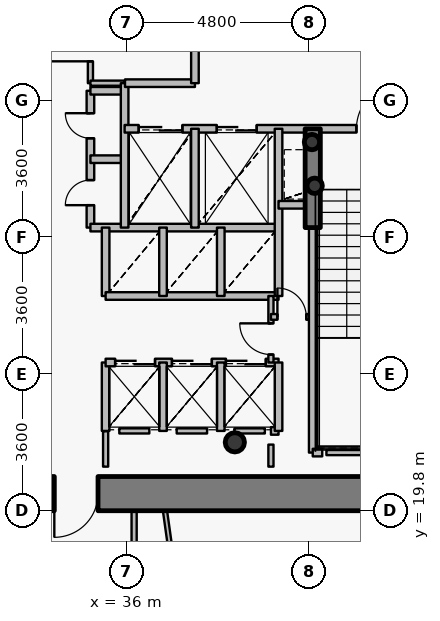
"""IFC4 building model, lengths in metres.
Left out: names, types, materials, properties, quantities, classifications, styles, units other than length and angle.
Written with IfcOpenShell. Run it as: python <this file> out.ifc"""

import sys

from ifc_helpers import new_model, si_unit, direction, frame, frame_2d, origin, origin_2d, place, context, subcontext, project, spatial, rectangle, hollow_circle, extrude, source, transform, mapped, element, fill, save


model = new_model("IFC4")
c1 = context("Model", 3, precision=1e-05, world=origin(), true_north=direction((0.0, 1.0)))
c2 = subcontext(c1, "Body", "Model", "MODEL_VIEW")
j1 = project(units=[si_unit("LENGTHUNIT", "METRE"), si_unit("PLANEANGLEUNIT", "RADIAN")], contexts=[c1])
p1 = place(None, origin())
s1 = spatial("IfcSite", under=j1, at=p1, CompositionType="ELEMENT")
p2 = place(p1, origin())
s2 = spatial("IfcBuilding", under=s1, at=p2, CompositionType="ELEMENT")
p3 = place(p2, frame((0.0, 0.0, 49.2)))
s3 = spatial("IfcBuildingStorey", under=s2, at=p3, CompositionType="ELEMENT", Elevation=49.2)
p4 = place(p3, frame((38.85, 21.6, 0.0), z_axis=(0.0, 0.0, 1.0), x_axis=(1.0, 0.0, 0.0)))
e1 = element("IfcColumn", 1, at=p4, inside=s3, PredefinedType="COLUMN", context=c2, shape_type="SweptSolid", body=[
    extrude(hollow_circle(Radius=0.254, WallThickness=0.02, at=origin_2d()), origin(), (0.0, 0.0, 1.0), 4.2),
])
for number, where, z_axis, x_axis in (
    (2, (40.95, 28.35, 0.0), (0.0, 0.0, 1.0), (1.0, 0.0, 0.0)),
    (3, (40.88, 29.5, 0.0), (0.0, 0.0, 1.0), (1.0, 0.0, 0.0)),
):
    element("IfcColumn", number, at=place(p3, frame(where, z_axis=z_axis, x_axis=x_axis)), inside=s3, PredefinedType="COLUMN", context=c2, shape_type="SweptSolid", body=[
        extrude(hollow_circle(Radius=0.203, WallThickness=0.016, at=origin_2d()), origin(), (0.0, 0.0, 1.0), 4.2),
    ])
p5 = place(p3, frame((45.25, 20.25, 0.0), z_axis=(0.0, 0.0, 1.0), x_axis=(-1.0, 0.0, 0.0)))
e4 = element("IfcWall", 4, at=p5, inside=s3, PredefinedType="SHEAR", context=c2, shape_type="SweptSolid", body=[
    extrude(rectangle(XDim=18.5, YDim=0.9, at=frame_2d((9.25, 0.0))), origin(), (0.0, 0.0, 1.0), 3.4),
])
p6 = place(p5, frame((10.0, 0.0, 0.0)))
e5 = element("IfcOpeningElement", 5, at=p6, cuts=e4, PredefinedType="OPENING", context=c2, shape_type="SweptSolid", body=[
    extrude(rectangle(XDim=1.15, YDim=2.15, at=origin_2d()), frame((0.575, 0.46, 1.075), z_axis=(0.0, -1.0, 0.0), x_axis=(1.0, 0.0, 0.0)), (0.0, 0.0, 1.0), 0.92),
])
p7 = place(p3, frame((40.9, 27.25, 0.0), z_axis=(0.0, 0.0, 1.0), x_axis=(0.0, 1.0, 0.0)))
e6 = element("IfcWall", 6, at=p7, inside=s3, PredefinedType="SHEAR", context=c2, shape_type="SweptSolid", body=[
    extrude(rectangle(XDim=2.6, YDim=0.4, at=frame_2d((1.3, 0.0))), origin(), (0.0, 0.0, 1.0), 3.55),
])
p8 = place(p3, frame((35.05, 27.25, 0.0), z_axis=(0.0, 0.0, 1.0), x_axis=(0.0, 1.0, 0.0)))
e7 = element("IfcWall", 7, at=p8, inside=s3, PredefinedType="PARTITIONING", context=c2, shape_type="SweptSolid", body=[
    extrude(rectangle(XDim=3.6, YDim=0.2, at=frame_2d((1.8, 0.0))), origin(), (0.0, 0.0, 1.0), 3.95),
])
p9 = place(p8, frame((0.59, 0.0, 0.0)))
e8 = element("IfcOpeningElement", 8, at=p9, cuts=e7, PredefinedType="OPENING", context=c2, shape_type="SweptSolid", body=[
    extrude(rectangle(XDim=0.66, YDim=2.05, at=origin_2d()), frame((0.33, 0.11, 1.025), z_axis=(0.0, -1.0, 0.0), x_axis=(1.0, 0.0, 0.0)), (0.0, 0.0, 1.0), 0.22),
])
p10 = place(p8, frame((2.35, 0.0, 0.0)))
e9 = element("IfcOpeningElement", 9, at=p10, cuts=e7, PredefinedType="OPENING", context=c2, shape_type="SweptSolid", body=[
    extrude(rectangle(XDim=0.66, YDim=2.05, at=origin_2d()), frame((0.33, 0.11, 1.025), z_axis=(0.0, -1.0, 0.0), x_axis=(1.0, 0.0, 0.0)), (0.0, 0.0, 1.0), 0.22),
])
p11 = place(p3, frame((35.05, 27.25, 0.0), z_axis=(0.0, 0.0, 1.0), x_axis=(1.0, 0.0, 0.0)))
e10 = element("IfcWall", 10, at=p11, inside=s3, PredefinedType="PARTITIONING", context=c2, shape_type="SweptSolid", body=[
    extrude(rectangle(XDim=4.95, YDim=0.2, at=frame_2d((2.475, 0.0))), origin(), (0.0, 0.0, 1.0), 3.535),
])
for number, where, z_axis, x_axis in (
    (11, (35.05, 29.05, 0.0), (0.0, 0.0, 1.0), (1.0, 0.0, 0.0)),
    (12, (35.05, 30.85, 0.0), (0.0, 0.0, 1.0), (1.0, 0.0, 0.0)),
):
    element("IfcWall", number, at=place(p3, frame(where, z_axis=z_axis, x_axis=x_axis)), inside=s3, PredefinedType="PARTITIONING", context=c2, shape_type="SweptSolid", body=[
        extrude(rectangle(XDim=0.9, YDim=0.2, at=frame_2d((0.45, 0.0))), origin(), (0.0, 0.0, 1.0), 3.95),
    ])
p12 = place(p3, frame((35.05, 31.05, 0.0), z_axis=(0.0, 0.0, 1.0), x_axis=(0.0, 1.0, 0.0)))
e13 = element("IfcWall", 13, at=p12, inside=s3, PredefinedType="PARTITIONING", context=c2, shape_type="SweptSolid", body=[
    extrude(rectangle(XDim=2.25, YDim=0.135, at=frame_2d((1.125, 0.0))), origin(), (0.0, 0.0, 1.0), 3.535),
])
p13 = place(p12, frame((0.575, 0.0, 0.0)))
e14 = element("IfcOpeningElement", 14, at=p13, cuts=e13, PredefinedType="OPENING", context=c2, shape_type="SweptSolid", body=[
    extrude(rectangle(XDim=1.1, YDim=2.15, at=origin_2d()), frame((0.55, 0.078, 1.075), z_axis=(0.0, -1.0, 0.0), x_axis=(1.0, 0.0, 0.0)), (0.0, 0.0, 1.0), 0.155),
])
p14 = place(p3, frame((35.05, 31.05, 0.0), z_axis=(0.0, 0.0, 1.0), x_axis=(1.0, 0.0, 0.0)))
e15 = element("IfcWall", 15, at=p14, inside=s3, PredefinedType="PARTITIONING", context=c2, shape_type="SweptSolid", body=[
    extrude(rectangle(XDim=0.9, YDim=0.135, at=frame_2d((0.45, 0.0))), origin(), (0.0, 0.0, 1.0), 3.95),
])
p15 = place(p3, frame((35.45, 21.9, 0.0), z_axis=(0.0, 0.0, 1.0), x_axis=(0.0, 1.0, 0.0)))
e16 = element("IfcWall", 16, at=p15, inside=s3, PredefinedType="PARTITIONING", context=c2, shape_type="SweptSolid", body=[
    extrude(rectangle(XDim=1.8, YDim=0.2, at=frame_2d((0.9, 0.0))), origin(), (0.0, 0.0, 1.0), 3.95),
])
p16 = place(p3, frame((35.45, 23.7, 0.0), z_axis=(0.0, 0.0, 1.0), x_axis=(1.0, 0.0, 0.0)))
e17 = element("IfcWall", 17, at=p16, inside=s3, PredefinedType="PARTITIONING", context=c2, shape_type="SweptSolid", body=[
    extrude(rectangle(XDim=4.55, YDim=0.2, at=frame_2d((2.275, 0.0))), origin(), (0.0, 0.0, 1.0), 3.535),
])
p17 = place(p16, frame((0.25, 0.0, 0.0)))
e18 = element("IfcOpeningElement", 18, at=p17, cuts=e17, PredefinedType="OPENING", context=c2, shape_type="SweptSolid", body=[
    extrude(rectangle(XDim=1.05, YDim=2.15, at=origin_2d()), frame((0.525, 0.11, 1.075), z_axis=(0.0, -1.0, 0.0), x_axis=(1.0, 0.0, 0.0)), (0.0, 0.0, 1.0), 0.22),
])
p18 = place(p16, frame((1.745, 0.0, 0.0)))
e19 = element("IfcOpeningElement", 19, at=p18, cuts=e17, PredefinedType="OPENING", context=c2, shape_type="SweptSolid", body=[
    extrude(rectangle(XDim=1.05, YDim=2.15, at=origin_2d()), frame((0.525, 0.11, 1.075), z_axis=(0.0, -1.0, 0.0), x_axis=(1.0, 0.0, 0.0)), (0.0, 0.0, 1.0), 0.22),
])
p19 = place(p16, frame((3.165, 0.0, 0.0)))
e20 = element("IfcOpeningElement", 20, at=p19, cuts=e17, PredefinedType="OPENING", context=c2, shape_type="SweptSolid", body=[
    extrude(rectangle(XDim=1.05, YDim=2.15, at=origin_2d()), frame((0.525, 0.11, 1.075), z_axis=(0.0, -1.0, 0.0), x_axis=(1.0, 0.0, 0.0)), (0.0, 0.0, 1.0), 0.22),
])
p20 = place(p3, frame((35.45, 25.45, 0.0), z_axis=(0.0, 0.0, 1.0), x_axis=(0.0, 1.0, 0.0)))
e21 = element("IfcWall", 21, at=p20, inside=s3, PredefinedType="PARTITIONING", context=c2, shape_type="SweptSolid", body=[
    extrude(rectangle(XDim=1.8, YDim=0.2, at=frame_2d((0.9, 0.0))), origin(), (0.0, 0.0, 1.0), 3.95),
])
p21 = place(p3, frame((35.45, 25.45, 0.0), z_axis=(0.0, 0.0, 1.0), x_axis=(1.0, 0.0, 0.0)))
e22 = element("IfcWall", 22, at=p21, inside=s3, PredefinedType="PARTITIONING", context=c2, shape_type="SweptSolid", body=[
    extrude(rectangle(XDim=4.55, YDim=0.2, at=frame_2d((2.275, 0.0))), origin(), (0.0, 0.0, 1.0), 3.535),
])
p22 = place(p3, frame((35.95, 27.25, 0.0), z_axis=(0.0, 0.0, 1.0), x_axis=(0.0, 1.0, 0.0)))
e23 = element("IfcWall", 23, at=p22, inside=s3, PredefinedType="PARTITIONING", context=c2, shape_type="SweptSolid", body=[
    extrude(rectangle(XDim=3.8, YDim=0.2, at=frame_2d((1.9, 0.0))), origin(), (0.0, 0.0, 1.0), 3.95),
])
p23 = place(p3, frame((35.95, 29.85, 0.0), z_axis=(0.0, 0.0, 1.0), x_axis=(1.0, 0.0, 0.0)))
e24 = element("IfcWall", 24, at=p23, inside=s3, PredefinedType="PARTITIONING", context=c2, shape_type="SweptSolid", body=[
    extrude(rectangle(XDim=8.49, YDim=0.2, at=frame_2d((4.245, 0.0))), origin(), (0.0, 0.0, 1.0), 3.535),
])
p24 = place(p23, frame((6.1, 0.0, 0.0)))
e25 = element("IfcOpeningElement", 25, at=p24, cuts=e24, PredefinedType="OPENING", context=c2, shape_type="SweptSolid", body=[
    extrude(rectangle(XDim=1.2, YDim=2.15, at=origin_2d()), frame((0.6, 0.11, 1.075), z_axis=(0.0, -1.0, 0.0), x_axis=(1.0, 0.0, 0.0)), (0.0, 0.0, 1.0), 0.22),
])
p25 = place(p23, frame((0.37, 0.0, 0.0)))
e26 = element("IfcOpeningElement", 26, at=p25, cuts=e24, PredefinedType="OPENING", context=c2, shape_type="SweptSolid", body=[
    extrude(rectangle(XDim=1.15, YDim=2.15, at=origin_2d()), frame((0.575, 0.11, 1.075), z_axis=(0.0, -1.0, 0.0), x_axis=(1.0, 0.0, 0.0)), (0.0, 0.0, 1.0), 0.22),
])
p26 = place(p23, frame((2.425, 0.0, 0.0)))
e27 = element("IfcOpeningElement", 27, at=p26, cuts=e24, PredefinedType="OPENING", context=c2, shape_type="SweptSolid", body=[
    extrude(rectangle(XDim=1.05, YDim=2.15, at=origin_2d()), frame((0.525, 0.11, 1.075), z_axis=(0.0, -1.0, 0.0), x_axis=(1.0, 0.0, 0.0)), (0.0, 0.0, 1.0), 0.22),
])
p27 = place(p3, frame((35.96, 31.05, 0.0), z_axis=(0.0, 0.0, 1.0), x_axis=(1.0, 0.0, 0.0)))
e28 = element("IfcWall", 28, at=p27, inside=s3, PredefinedType="PARTITIONING", context=c2, shape_type="SweptSolid", body=[
    extrude(rectangle(XDim=1.84, YDim=0.2, at=frame_2d((0.92, 0.0))), origin(), (0.0, 0.0, 1.0), 3.95),
])
p28 = place(p3, frame((36.2, 17.9, 0.0), z_axis=(0.0, 0.0, 1.0), x_axis=(0.0, 1.0, 0.0)))
e29 = element("IfcWall", 29, at=p28, inside=s3, PredefinedType="PARTITIONING", context=c2, shape_type="SweptSolid", body=[
    extrude(rectangle(XDim=1.9, YDim=0.135, at=frame_2d((0.95, 0.0))), origin(), (0.0, 0.0, 1.0), 3.285),
])
for number, where, z_axis, x_axis in (
    (30, (36.96, 21.9, 0.0), (0.0, 0.0, 1.0), (0.0, 1.0, 0.0)),
    (31, (36.96, 25.45, 0.0), (0.0, 0.0, 1.0), (0.0, 1.0, 0.0)),
):
    element("IfcWall", number, at=place(p3, frame(where, z_axis=z_axis, x_axis=x_axis)), inside=s3, PredefinedType="PARTITIONING", context=c2, shape_type="SweptSolid", body=[
        extrude(rectangle(XDim=1.8, YDim=0.2, at=frame_2d((0.9, 0.0))), origin(), (0.0, 0.0, 1.0), 3.95),
    ])
p29 = place(p3, frame((37.012, 19.8, 0.0), z_axis=(0.0, 0.0, 1.0), x_axis=(0.139168038406, -0.990268780224, 0.0)))
e32 = element("IfcWall", 32, at=p29, inside=s3, PredefinedType="MOVABLE", context=c2, shape_type="SweptSolid", body=[
    extrude(rectangle(XDim=17.067, YDim=0.11, at=frame_2d((8.534, 0.0))), origin(), (0.0, 0.0, 1.0), 3.335),
])
p30 = place(p3, frame((37.8, 27.25, 0.0), z_axis=(0.0, 0.0, 1.0), x_axis=(0.0, 1.0, 0.0)))
e33 = element("IfcWall", 33, at=p30, inside=s3, PredefinedType="PARTITIONING", context=c2, shape_type="SweptSolid", body=[
    extrude(rectangle(XDim=2.6, YDim=0.2, at=frame_2d((1.3, 0.0))), origin(), (0.0, 0.0, 1.0), 3.95),
])
p31 = place(p3, frame((37.8, 31.05, 0.0), z_axis=(0.0, 0.0, 1.0), x_axis=(0.0, 1.0, 0.0)))
e34 = element("IfcWall", 34, at=p31, inside=s3, PredefinedType="PARTITIONING", context=c2, shape_type="SweptSolid", body=[
    extrude(rectangle(XDim=2.25, YDim=0.2, at=frame_2d((1.125, 0.0))), origin(), (0.0, 0.0, 1.0), 3.535),
])
for number, where, z_axis, x_axis in (
    (35, (38.48, 21.9, 0.0), (0.0, 0.0, 1.0), (0.0, 1.0, 0.0)),
    (36, (38.48, 25.45, 0.0), (0.0, 0.0, 1.0), (0.0, 1.0, 0.0)),
):
    element("IfcWall", number, at=place(p3, frame(where, z_axis=z_axis, x_axis=x_axis)), inside=s3, PredefinedType="PARTITIONING", context=c2, shape_type="SweptSolid", body=[
        extrude(rectangle(XDim=1.8, YDim=0.2, at=frame_2d((0.9, 0.0))), origin(), (0.0, 0.0, 1.0), 3.95),
    ])
p32 = place(p3, frame((39.8, 21.9, 0.0), z_axis=(0.0, 0.0, 1.0), x_axis=(1.0, 0.0, 0.0)))
e37 = element("IfcWall", 37, at=p32, inside=s3, PredefinedType="PARTITIONING", context=c2, shape_type="SweptSolid", body=[
    extrude(rectangle(XDim=0.2, YDim=0.2, at=frame_2d((0.1, 0.0))), origin(), (0.0, 0.0, 1.0), 3.95),
])
p33 = place(p3, frame((39.8, 23.7, 0.0), z_axis=(0.0, 0.0, 1.0), x_axis=(0.0, 1.0, 0.0)))
e38 = element("IfcWall", 38, at=p33, inside=s3, PredefinedType="PARTITIONING", context=c2, shape_type="SweptSolid", body=[
    extrude(rectangle(XDim=1.75, YDim=0.135, at=frame_2d((0.875, 0.0))), origin(), (0.0, 0.0, 1.0), 3.95),
])
p34 = place(p33, frame((0.21, 0.0, 0.0)))
e39 = element("IfcOpeningElement", 39, at=p34, cuts=e38, PredefinedType="OPENING", context=c2, shape_type="SweptSolid", body=[
    extrude(rectangle(XDim=0.82, YDim=2.1, at=origin_2d()), frame((0.41, 0.078, 1.05), z_axis=(0.0, -1.0, 0.0), x_axis=(1.0, 0.0, 0.0)), (0.0, 0.0, 1.0), 0.155),
])
p35 = place(p3, frame((39.8, 24.9, 0.0), z_axis=(0.0, 0.0, 1.0), x_axis=(1.0, 0.0, 0.0)))
e40 = element("IfcWall", 40, at=p35, inside=s3, PredefinedType="PARTITIONING", context=c2, shape_type="SweptSolid", body=[
    extrude(rectangle(XDim=1.1, YDim=0.15, at=frame_2d((0.55, 0.0))), origin(), (0.0, 0.0, 1.0), 3.95),
])
p36 = place(p35, frame((0.17, 0.0, 0.0)))
e41 = element("IfcOpeningElement", 41, at=p36, cuts=e40, PredefinedType="OPENING", context=c2, shape_type="SweptSolid", body=[
    extrude(rectangle(XDim=0.76, YDim=2.1, at=origin_2d()), frame((0.38, 0.085, 1.05), z_axis=(0.0, -1.0, 0.0), x_axis=(1.0, 0.0, 0.0)), (0.0, 0.0, 1.0), 0.17),
])
p37 = place(p3, frame((40.0, 21.9, 0.0), z_axis=(0.0, 0.0, 1.0), x_axis=(0.0, 1.0, 0.0)))
e42 = element("IfcWall", 42, at=p37, inside=s3, PredefinedType="PARTITIONING", context=c2, shape_type="SweptSolid", body=[
    extrude(rectangle(XDim=1.8, YDim=0.2, at=frame_2d((0.9, 0.0))), origin(), (0.0, 0.0, 1.0), 3.95),
])
p38 = place(p3, frame((40.0, 25.45, 0.0), z_axis=(0.0, 0.0, 1.0), x_axis=(0.0, 1.0, 0.0)))
e43 = element("IfcWall", 43, at=p38, inside=s3, PredefinedType="PARTITIONING", context=c2, shape_type="SweptSolid", body=[
    extrude(rectangle(XDim=4.4, YDim=0.2, at=frame_2d((2.2, 0.0))), origin(), (0.0, 0.0, 1.0), 3.95),
])
p39 = place(p3, frame((40.0, 27.85, 0.0), z_axis=(0.0, 0.0, 1.0), x_axis=(1.0, 0.0, 0.0)))
e44 = element("IfcWall", 44, at=p39, inside=s3, PredefinedType="PARTITIONING", context=c2, shape_type="SweptSolid", body=[
    extrude(rectangle(XDim=0.9, YDim=0.2, at=frame_2d((0.45, 0.0))), origin(), (0.0, 0.0, 1.0), 3.95),
])
p40 = place(p3, frame((40.9, 21.33, 0.0), z_axis=(0.0, 0.0, 1.0), x_axis=(0.0, 1.0, 0.0)))
e45 = element("IfcWall", 45, at=p40, inside=s3, PredefinedType="PARTITIONING", context=c2, shape_type="SweptSolid", body=[
    extrude(rectangle(XDim=5.91, YDim=0.2, at=frame_2d((2.955, 0.0))), origin(), (0.0, 0.0, 1.0), 3.485),
])
p41 = place(p3, frame((40.9, 21.33, 0.0), z_axis=(0.0, 0.0, 1.0), x_axis=(1.0, 0.0, 0.0)))
e46 = element("IfcWall", 46, at=p41, inside=s3, PredefinedType="PARTITIONING", context=c2, shape_type="SweptSolid", body=[
    extrude(rectangle(XDim=0.25, YDim=0.2, at=frame_2d((0.125, 0.0))), origin(), (0.0, 0.0, 1.0), 3.485),
])
p42 = place(p3, frame((44.08, 21.33, 0.0), z_axis=(0.0, 0.0, 1.0), x_axis=(-1.0, 0.0, 0.0)))
e47 = element("IfcWall", 47, at=p42, inside=s3, PredefinedType="PARTITIONING", context=c2, shape_type="SweptSolid", body=[
    extrude(rectangle(XDim=2.82, YDim=0.135, at=frame_2d((1.41, 0.0))), origin(), (0.0, 0.0, 1.0), 3.485),
])
p43 = place(p3, frame((36.6, 21.9, 0.0), z_axis=(0.0, 0.0, 1.0), x_axis=(-1.0, 0.0, 0.0)))
e48 = element("IfcWall", 48, at=p43, inside=s3, PredefinedType="PARTITIONING", context=c2, shape_type="SweptSolid", body=[
    extrude(rectangle(XDim=0.79, YDim=0.135, at=frame_2d((0.395, 0.0))), origin(), (0.0, 0.0, 1.0), 3.95),
])
p44 = place(p3, frame((38.12, 21.9, 0.0), z_axis=(0.0, 0.0, 1.0), x_axis=(-1.0, 0.0, 0.0)))
e49 = element("IfcWall", 49, at=p44, inside=s3, PredefinedType="PARTITIONING", context=c2, shape_type="SweptSolid", body=[
    extrude(rectangle(XDim=0.8, YDim=0.135, at=frame_2d((0.4, 0.0))), origin(), (0.0, 0.0, 1.0), 3.95),
])
p45 = place(p3, frame((39.64, 21.9, 0.0), z_axis=(0.0, 0.0, 1.0), x_axis=(-1.0, 0.0, 0.0)))
e50 = element("IfcWall", 50, at=p45, inside=s3, PredefinedType="PARTITIONING", context=c2, shape_type="SweptSolid", body=[
    extrude(rectangle(XDim=0.8, YDim=0.135, at=frame_2d((0.4, 0.0))), origin(), (0.0, 0.0, 1.0), 3.535),
])
p46 = place(p3, frame((39.8, 20.96, 0.0), z_axis=(0.0, 0.0, 1.0), x_axis=(0.0, 1.0, 0.0)))
e51 = element("IfcWall", 51, at=p46, inside=s3, PredefinedType="PARTITIONING", context=c2, shape_type="SweptSolid", body=[
    extrude(rectangle(XDim=0.58, YDim=0.135, at=frame_2d((0.29, 0.0))), origin(), (0.0, 0.0, 1.0), 3.485),
])
p47 = place(p3, frame((35.45, 21.89, 0.0), z_axis=(0.0, 0.0, 1.0), x_axis=(0.0, -1.0, 0.0)))
e52 = element("IfcWall", 52, at=p47, inside=s3, PredefinedType="PARTITIONING", context=c2, shape_type="SweptSolid", body=[
    extrude(rectangle(XDim=0.93, YDim=0.135, at=frame_2d((0.465, 0.0))), origin(), (0.0, 0.0, 1.0), 3.535),
])
m1 = source(origin(), c2, "Body", "SweptSolid", [
    extrude(rectangle(XDim=1.15, YDim=2.15, at=origin_2d()), frame((0.575, 0.025, 1.075), z_axis=(0.0, -1.0, 0.0), x_axis=(1.0, 0.0, 0.0)), (0.0, 0.0, 1.0), 0.05),
])
p48 = place(p6, origin())
e53 = element("IfcDoor", 53, at=p48, inside=s3, OperationType="SINGLE_SWING_RIGHT", PredefinedType="DOOR", context=c2, shape_type="MappedRepresentation", body=[
    mapped(m1, transform((0.0, 0.0, 0.0), x_axis=(1.0, 0.0, 0.0), y_axis=(0.0, 1.0, 0.0), z_axis=(0.0, 0.0, 1.0), scale=1.0)),
])
fill(e5, e53)
m2 = source(origin(), c2, "Body", "SweptSolid", [
    extrude(rectangle(XDim=1.2, YDim=2.15, at=origin_2d()), frame((0.6, 0.025, 1.075), z_axis=(0.0, -1.0, 0.0), x_axis=(1.0, 0.0, 0.0)), (0.0, 0.0, 1.0), 0.05),
])
p49 = place(p24, origin())
e54 = element("IfcDoor", 54, at=p49, inside=s3, OperationType="SINGLE_SWING_RIGHT", PredefinedType="DOOR", context=c2, shape_type="MappedRepresentation", body=[
    mapped(m2, transform((0.0, 0.0, 0.0), x_axis=(1.0, 0.0, 0.0), y_axis=(0.0, 1.0, 0.0), z_axis=(0.0, 0.0, 1.0), scale=1.0)),
])
fill(e25, e54)
m3 = source(origin(), c2, "Body", "SweptSolid", [
    extrude(rectangle(XDim=1.15, YDim=2.15, at=origin_2d()), frame((0.575, 0.025, 1.075), z_axis=(0.0, -1.0, 0.0), x_axis=(1.0, 0.0, 0.0)), (0.0, 0.0, 1.0), 0.05),
])
p50 = place(p25, origin())
e55 = element("IfcDoor", 55, at=p50, inside=s3, OperationType="DOUBLE_DOOR_SLIDING", PredefinedType="USERDEFINED", context=c2, shape_type="MappedRepresentation", body=[
    mapped(m3, transform((0.0, 0.0, 0.0), x_axis=(1.0, 0.0, 0.0), y_axis=(0.0, 1.0, 0.0), z_axis=(0.0, 0.0, 1.0), scale=1.0)),
])
fill(e26, e55)
m4 = source(origin(), c2, "Body", "SweptSolid", [
    extrude(rectangle(XDim=1.05, YDim=2.15, at=origin_2d()), frame((0.525, 0.025, 1.075), z_axis=(0.0, -1.0, 0.0), x_axis=(1.0, 0.0, 0.0)), (0.0, 0.0, 1.0), 0.05),
])
p51 = place(p26, origin())
e56 = element("IfcDoor", 56, at=p51, inside=s3, OperationType="DOUBLE_DOOR_SLIDING", PredefinedType="USERDEFINED", context=c2, shape_type="MappedRepresentation", body=[
    mapped(m4, transform((0.0, 0.0, 0.0), x_axis=(1.0, 0.0, 0.0), y_axis=(0.0, 1.0, 0.0), z_axis=(0.0, 0.0, 1.0), scale=1.0)),
])
fill(e27, e56)
p52 = place(p17, origin())
e57 = element("IfcDoor", 57, at=p52, inside=s3, OperationType="DOUBLE_DOOR_SLIDING", PredefinedType="USERDEFINED", context=c2, shape_type="MappedRepresentation", body=[
    mapped(m4, transform((0.0, 0.0, 0.0), x_axis=(1.0, 0.0, 0.0), y_axis=(0.0, 1.0, 0.0), z_axis=(0.0, 0.0, 1.0), scale=1.0)),
])
fill(e18, e57)
p53 = place(p18, origin())
e58 = element("IfcDoor", 58, at=p53, inside=s3, OperationType="DOUBLE_DOOR_SLIDING", PredefinedType="USERDEFINED", context=c2, shape_type="MappedRepresentation", body=[
    mapped(m4, transform((0.0, 0.0, 0.0), x_axis=(1.0, 0.0, 0.0), y_axis=(0.0, 1.0, 0.0), z_axis=(0.0, 0.0, 1.0), scale=1.0)),
])
fill(e19, e58)
p54 = place(p19, origin())
e59 = element("IfcDoor", 59, at=p54, inside=s3, OperationType="DOUBLE_DOOR_SLIDING", PredefinedType="USERDEFINED", context=c2, shape_type="MappedRepresentation", body=[
    mapped(m4, transform((0.0, 0.0, 0.0), x_axis=(1.0, 0.0, 0.0), y_axis=(0.0, 1.0, 0.0), z_axis=(0.0, 0.0, 1.0), scale=1.0)),
])
fill(e20, e59)
m5 = source(origin(), c2, "Body", "SweptSolid", [
    extrude(rectangle(XDim=0.66, YDim=2.05, at=origin_2d()), frame((0.33, 0.025, 1.025), z_axis=(0.0, -1.0, 0.0), x_axis=(1.0, 0.0, 0.0)), (0.0, 0.0, 1.0), 0.05),
])
p55 = place(p9, origin())
e60 = element("IfcDoor", 60, at=p55, inside=s3, OperationType="SINGLE_SWING_LEFT", PredefinedType="USERDEFINED", context=c2, shape_type="MappedRepresentation", body=[
    mapped(m5, transform((0.0, 0.0, 0.0), x_axis=(1.0, 0.0, 0.0), y_axis=(0.0, 1.0, 0.0), z_axis=(0.0, 0.0, 1.0), scale=1.0)),
])
fill(e8, e60)
p56 = place(p10, origin())
e61 = element("IfcDoor", 61, at=p56, inside=s3, OperationType="SINGLE_SWING_RIGHT", PredefinedType="USERDEFINED", context=c2, shape_type="MappedRepresentation", body=[
    mapped(m5, transform((0.0, 0.0, 0.0), x_axis=(1.0, 0.0, 0.0), y_axis=(0.0, 1.0, 0.0), z_axis=(0.0, 0.0, 1.0), scale=1.0)),
])
fill(e9, e61)
m6 = source(origin(), c2, "Body", "SweptSolid", [
    extrude(rectangle(XDim=1.1, YDim=2.15, at=origin_2d()), frame((0.55, 0.025, 1.075), z_axis=(0.0, -1.0, 0.0), x_axis=(1.0, 0.0, 0.0)), (0.0, 0.0, 1.0), 0.05),
])
p57 = place(p13, origin())
e62 = element("IfcDoor", 62, at=p57, inside=s3, OperationType="SINGLE_SWING_LEFT", PredefinedType="DOOR", context=c2, shape_type="MappedRepresentation", body=[
    mapped(m6, transform((0.0, 0.0, 0.0), x_axis=(1.0, 0.0, 0.0), y_axis=(0.0, 1.0, 0.0), z_axis=(0.0, 0.0, 1.0), scale=1.0)),
])
fill(e14, e62)
m7 = source(origin(), c2, "Body", "SweptSolid", [
    extrude(rectangle(XDim=0.82, YDim=2.1, at=origin_2d()), frame((0.41, 0.025, 1.05), z_axis=(0.0, -1.0, 0.0), x_axis=(1.0, 0.0, 0.0)), (0.0, 0.0, 1.0), 0.05),
])
p58 = place(p34, origin())
e63 = element("IfcDoor", 63, at=p58, inside=s3, OperationType="SINGLE_SWING_RIGHT", PredefinedType="DOOR", context=c2, shape_type="MappedRepresentation", body=[
    mapped(m7, transform((0.0, 0.0, 0.0), x_axis=(1.0, 0.0, 0.0), y_axis=(0.0, 1.0, 0.0), z_axis=(0.0, 0.0, 1.0), scale=1.0)),
])
fill(e39, e63)
m8 = source(origin(), c2, "Body", "SweptSolid", [
    extrude(rectangle(XDim=0.76, YDim=2.1, at=origin_2d()), frame((0.38, 0.025, 1.05), z_axis=(0.0, -1.0, 0.0), x_axis=(1.0, 0.0, 0.0)), (0.0, 0.0, 1.0), 0.05),
])
p59 = place(p36, origin())
e64 = element("IfcDoor", 64, at=p59, inside=s3, OperationType="SINGLE_SWING_LEFT", PredefinedType="DOOR", context=c2, shape_type="MappedRepresentation", body=[
    mapped(m8, transform((0.0, 0.0, 0.0), x_axis=(1.0, 0.0, 0.0), y_axis=(0.0, 1.0, 0.0), z_axis=(0.0, 0.0, 1.0), scale=1.0)),
])
fill(e41, e64)
save(model, sys.argv[1])
